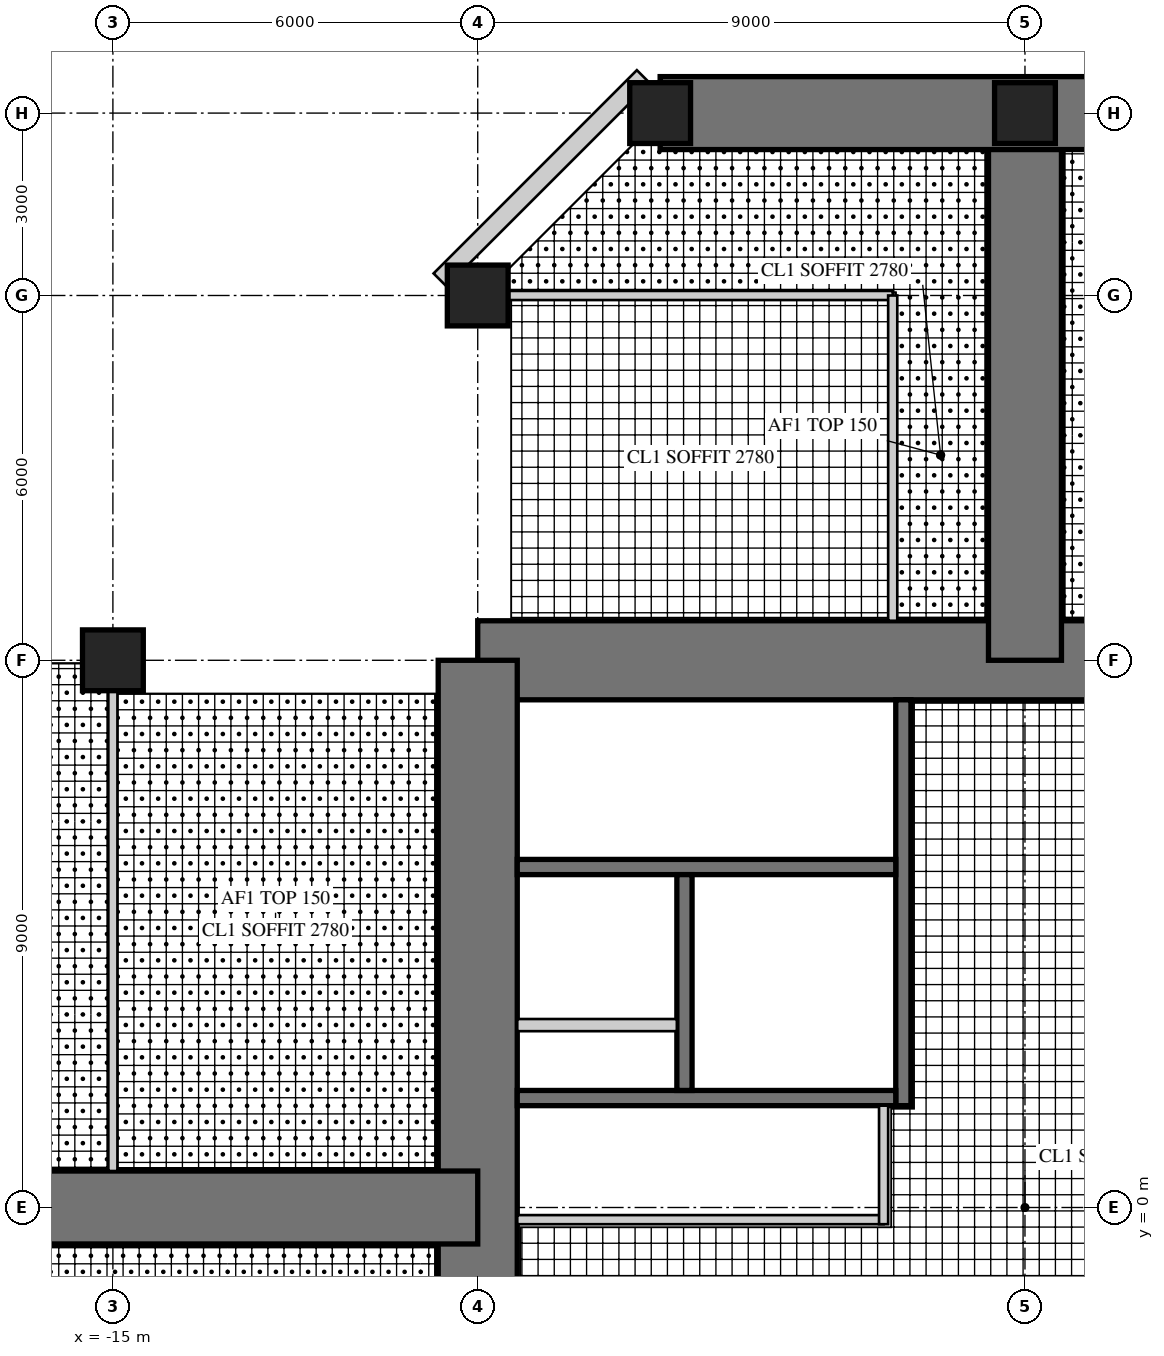
"""IFC4 building model, lengths in metres.
Left out: names, types, materials, properties, quantities, classifications, styles, units other than length and angle.
Written with IfcOpenShell. Run it as: python <this file> out.ifc"""

import sys

from ifc_helpers import new_model, si_unit, direction, frame, frame_2d, origin, origin_2d, place, context, subcontext, project, spatial, rectangle, hollow_rectangle, extrude, element, fill, save


model = new_model("IFC4")
c1 = context("Model", 3, precision=1e-05, world=origin(), true_north=direction((0.0, 1.0)))
c2 = subcontext(c1, "Body", "Model", "MODEL_VIEW")
j1 = project(units=[si_unit("LENGTHUNIT", "METRE"), si_unit("PLANEANGLEUNIT", "RADIAN")], contexts=[c1])
p1 = place(None, origin())
s1 = spatial("IfcSite", under=j1, at=p1, CompositionType="ELEMENT")
p2 = place(p1, origin())
s2 = spatial("IfcBuilding", under=s1, at=p2, CompositionType="ELEMENT")
p3 = place(p2, frame((0.0, 0.0, 152.5)))
s3 = spatial("IfcBuildingStorey", under=s2, at=p3, CompositionType="ELEMENT", Elevation=152.5)
p4 = place(p3, frame((9.0, 9.0, 0.0), z_axis=(0.0, 0.0, 1.0), x_axis=(-1.0, 0.0, 0.0)))
e1 = element("IfcWall", 1, at=p4, inside=s3, PredefinedType="SHEAR", context=c2, shape_type="SweptSolid", body=[
    extrude(rectangle(XDim=18.0, YDim=1.3, at=frame_2d((9.0, 0.0))), origin(), (0.0, 0.0, 1.0), 4.0),
])
p5 = place(p4, frame((9.8, 0.0, 0.0)))
e2 = element("IfcOpeningElement", 2, at=p5, cuts=e1, PredefinedType="OPENING", context=c2, shape_type="SweptSolid", body=[
    extrude(rectangle(XDim=1.0, YDim=2.4, at=frame_2d((0.5, 1.2))), frame((0.0, 0.66, 0.0), z_axis=(0.0, -1.0, 0.0), x_axis=(1.0, 0.0, 0.0)), (0.0, 0.0, 1.0), 1.32),
])
p6 = place(p3, frame((-9.0, 9.0, 0.0), z_axis=(0.0, 0.0, 1.0), x_axis=(0.0, -1.0, 0.0)))
e3 = element("IfcWall", 3, at=p6, inside=s3, PredefinedType="SHEAR", context=c2, shape_type="SweptSolid", body=[
    extrude(rectangle(XDim=18.0, YDim=1.3, at=frame_2d((9.0, 0.0))), origin(), (0.0, 0.0, 1.0), 4.0),
])
p7 = place(p6, frame((9.8, 0.0, 0.0)))
e4 = element("IfcOpeningElement", 4, at=p7, cuts=e3, PredefinedType="OPENING", context=c2, shape_type="SweptSolid", body=[
    extrude(rectangle(XDim=1.0, YDim=2.4, at=frame_2d((0.5, 1.2))), frame((0.0, 0.66, 0.0), z_axis=(0.0, -1.0, 0.0), x_axis=(1.0, 0.0, 0.0)), (0.0, 0.0, 1.0), 1.32),
])
p8 = place(p3, frame((-2.0, 1.675, 0.0), z_axis=(0.0, 0.0, 1.0), x_axis=(0.0, 1.0, 0.0)))
e5 = element("IfcWall", 5, at=p8, inside=s3, PredefinedType="SHEAR", context=c2, shape_type="SweptSolid", body=[
    extrude(rectangle(XDim=6.675, YDim=0.25, at=frame_2d((3.337, 0.0))), origin(), (0.0, 0.0, 1.0), 4.0),
])
p9 = place(p8, frame((0.725, 0.0, 0.0)))
e6 = element("IfcOpeningElement", 6, at=p9, cuts=e5, PredefinedType="OPENING", context=c2, shape_type="SweptSolid", body=[
    extrude(rectangle(XDim=1.0, YDim=2.1, at=frame_2d((0.5, 1.05))), frame((0.0, 0.135, 0.0), z_axis=(0.0, -1.0, 0.0), x_axis=(1.0, 0.0, 0.0)), (0.0, 0.0, 1.0), 0.27),
])
p10 = place(p3, frame((-2.125, 1.8, 0.0), z_axis=(0.0, 0.0, 1.0), x_axis=(-1.0, 0.0, 0.0)))
e7 = element("IfcWall", 7, at=p10, inside=s3, PredefinedType="SHEAR", context=c2, shape_type="SweptSolid", body=[
    extrude(rectangle(XDim=6.225, YDim=0.25, at=frame_2d((3.113, 0.0))), origin(), (0.0, 0.0, 1.0), 4.0),
])
p11 = place(p3, frame((-2.125, 5.6, 0.0), z_axis=(0.0, 0.0, 1.0), x_axis=(-1.0, 0.0, 0.0)))
e8 = element("IfcWall", 8, at=p11, inside=s3, PredefinedType="SHEAR", context=c2, shape_type="SweptSolid", body=[
    extrude(rectangle(XDim=6.225, YDim=0.25, at=frame_2d((3.113, 0.0))), origin(), (0.0, 0.0, 1.0), 4.0),
])
p12 = place(p11, frame((0.175, 0.0, 0.0)))
e9 = element("IfcOpeningElement", 9, at=p12, cuts=e8, PredefinedType="OPENING", context=c2, shape_type="SweptSolid", body=[
    extrude(rectangle(XDim=1.0, YDim=2.1, at=frame_2d((0.5, 1.05))), frame((0.0, 0.135, 0.0), z_axis=(0.0, -1.0, 0.0), x_axis=(1.0, 0.0, 0.0)), (0.0, 0.0, 1.0), 0.27),
])
p13 = place(p3, frame((-5.6, 1.925, 0.0), z_axis=(0.0, 0.0, 1.0), x_axis=(0.0, 1.0, 0.0)))
e10 = element("IfcWall", 10, at=p13, inside=s3, PredefinedType="SHEAR", context=c2, shape_type="SweptSolid", body=[
    extrude(rectangle(XDim=3.55, YDim=0.25, at=frame_2d((1.775, 0.0))), origin(), (0.0, 0.0, 1.0), 4.0),
])
p14 = place(p13, frame((1.525, 0.0, 0.0)))
e11 = element("IfcOpeningElement", 11, at=p14, cuts=e10, PredefinedType="OPENING", context=c2, shape_type="SweptSolid", body=[
    extrude(rectangle(XDim=1.1, YDim=2.2, at=frame_2d((0.55, 1.1))), frame((0.0, 0.135, 0.0), z_axis=(0.0, -1.0, 0.0), x_axis=(1.0, 0.0, 0.0)), (0.0, 0.0, 1.0), 0.27),
])
p15 = place(p13, frame((0.075, 0.0, 0.0)))
e12 = element("IfcOpeningElement", 12, at=p15, cuts=e10, PredefinedType="OPENING", context=c2, shape_type="SweptSolid", body=[
    extrude(rectangle(XDim=0.8, YDim=2.1, at=frame_2d((0.4, 1.05))), frame((0.0, 0.135, 0.0), z_axis=(0.0, -1.0, 0.0), x_axis=(1.0, 0.0, 0.0)), (0.0, 0.0, 1.0), 0.27),
])
p16 = place(p3, frame((-5.725, 3.0, 0.0), z_axis=(0.0, 0.0, 1.0), x_axis=(-1.0, 0.0, 0.0)))
e13 = element("IfcWall", 13, at=p16, inside=s3, PredefinedType="PARTITIONING", context=c2, shape_type="SweptSolid", body=[
    extrude(rectangle(XDim=2.625, YDim=0.2, at=frame_2d((1.312, 0.0))), origin(), (0.0, 0.0, 1.0), 4.0),
])
p17 = place(p3, frame((0.0, 9.0, 0.0), z_axis=(0.0, 0.0, 1.0), x_axis=(0.0, 1.0, 0.0)))
e14 = element("IfcWall", 14, at=p17, inside=s3, PredefinedType="SHEAR", context=c2, shape_type="SweptSolid", body=[
    extrude(rectangle(XDim=9.0, YDim=1.2, at=frame_2d((4.5, 0.0))), origin(), (0.0, 0.0, 1.0), 4.0),
])
p18 = place(p17, frame((4.3, 0.0, 0.0)))
e15 = element("IfcOpeningElement", 15, at=p18, cuts=e14, PredefinedType="OPENING", context=c2, shape_type="SweptSolid", body=[
    extrude(rectangle(XDim=1.0, YDim=2.2, at=frame_2d((0.5, 1.1))), frame((0.0, 0.61, 0.0), z_axis=(0.0, -1.0, 0.0), x_axis=(1.0, 0.0, 0.0)), (0.0, 0.0, 1.0), 1.22),
])
p19 = place(p3, frame((6.0, 18.0, 0.0), z_axis=(0.0, 0.0, 1.0), x_axis=(-1.0, 0.0, 0.0)))
e16 = element("IfcWall", 16, at=p19, inside=s3, PredefinedType="SHEAR", context=c2, shape_type="SweptSolid", body=[
    extrude(rectangle(XDim=12.0, YDim=1.2, at=frame_2d((6.0, 0.0))), origin(), (0.0, 0.0, 1.0), 4.0),
])
p20 = place(p19, frame((1.55, 0.0, 0.6)))
e17 = element("IfcOpeningElement", 17, at=p20, cuts=e16, PredefinedType="OPENING", context=c2, shape_type="SweptSolid", body=[
    extrude(rectangle(XDim=3.0, YDim=2.4, at=frame_2d((1.5, 1.2))), frame((0.0, 0.61, 0.0), z_axis=(0.0, -1.0, 0.0), x_axis=(1.0, 0.0, 0.0)), (0.0, 0.0, 1.0), 1.22),
])
p21 = place(p19, frame((7.45, 0.0, 0.6)))
e18 = element("IfcOpeningElement", 18, at=p21, cuts=e16, PredefinedType="OPENING", context=c2, shape_type="SweptSolid", body=[
    extrude(rectangle(XDim=3.0, YDim=2.4, at=frame_2d((1.5, 1.2))), frame((0.0, 0.61, 0.0), z_axis=(0.0, -1.0, 0.0), x_axis=(1.0, 0.0, 0.0)), (0.0, 0.0, 1.0), 1.22),
])
p22 = place(p3, frame((-9.0, 0.0, 0.0), z_axis=(0.0, 0.0, 1.0), x_axis=(-1.0, 0.0, 0.0)))
e19 = element("IfcWall", 19, at=p22, inside=s3, PredefinedType="SHEAR", context=c2, shape_type="SweptSolid", body=[
    extrude(rectangle(XDim=18.0, YDim=1.2, at=frame_2d((9.0, 0.0))), origin(), (0.0, 0.0, 1.0), 4.0),
])
p23 = place(p22, frame((9.8, 0.0, 0.0)))
e20 = element("IfcOpeningElement", 20, at=p23, cuts=e19, PredefinedType="OPENING", context=c2, shape_type="SweptSolid", body=[
    extrude(rectangle(XDim=1.0, YDim=2.2, at=frame_2d((0.5, 1.1))), frame((0.0, 0.61, 0.0), z_axis=(0.0, -1.0, 0.0), x_axis=(1.0, 0.0, 0.0)), (0.0, 0.0, 1.0), 1.22),
])
for number, where, z_axis, x_axis in (
    (21, (-9.0, 15.0, 0.0), (0.0, 0.0, 1.0), (1.0, 0.0, 0.0)),
    (22, (0.0, 18.0, 0.0), (0.0, 0.0, 1.0), (1.0, 0.0, 0.0)),
    (23, (-6.0, 18.0, 0.0), (0.0, 0.0, 1.0), (1.0, 0.0, 0.0)),
    (24, (-15.0, 9.0, 0.0), (0.0, 0.0, 1.0), (1.0, 0.0, 0.0)),
):
    element("IfcColumn", number, at=place(p3, frame(where, z_axis=z_axis, x_axis=x_axis)), inside=s3, PredefinedType="COLUMN", context=c2, shape_type="SweptSolid", body=[
        extrude(rectangle(XDim=1.0, YDim=1.0, at=origin_2d()), origin(), (0.0, 0.0, 1.0), 4.0),
    ])
p24 = place(p3, frame((-6.277, 18.6, 0.0), z_axis=(0.0, 0.0, 1.0), x_axis=(-0.707106781187, -0.707106781187, 0.0)))
e25 = element("IfcWall", 25, at=p24, inside=s3, PredefinedType="SOLIDWALL", context=c2, shape_type="SweptSolid", body=[
    extrude(rectangle(XDim=4.728, YDim=0.3, at=frame_2d((2.364, 0.0))), origin(), (0.0, 0.0, 1.0), 3.8),
])
p25 = place(p24, frame((1.914, 0.0, 0.3)))
e26 = element("IfcOpeningElement", 26, at=p25, cuts=e25, PredefinedType="OPENING", context=c2, shape_type="SweptSolid", body=[
    extrude(rectangle(XDim=0.9, YDim=2.4, at=frame_2d((0.45, 1.2))), frame((0.0, 0.16, 0.0), z_axis=(0.0, -1.0, 0.0), x_axis=(1.0, 0.0, 0.0)), (0.0, 0.0, 1.0), 0.32),
])
p26 = place(p3, frame((-2.325, -0.2, 0.0), z_axis=(0.0, 0.0, 1.0), x_axis=(-1.0, 0.0, 0.0)))
e27 = element("IfcWall", 27, at=p26, inside=s3, PredefinedType="PARTITIONING", context=c2, shape_type="SweptSolid", body=[
    extrude(rectangle(XDim=6.025, YDim=0.15, at=frame_2d((3.013, 0.0))), origin(), (0.0, 0.0, 1.0), 3.8),
])
p27 = place(p26, frame((0.4, 0.0, 0.0)))
e28 = element("IfcOpeningElement", 28, at=p27, cuts=e27, PredefinedType="OPENING", context=c2, shape_type="SweptSolid", body=[
    extrude(rectangle(XDim=1.0, YDim=2.1, at=frame_2d((0.5, 1.05))), frame((0.0, 0.085, 0.0), z_axis=(0.0, -1.0, 0.0), x_axis=(1.0, 0.0, 0.0)), (0.0, 0.0, 1.0), 0.17),
])
p28 = place(p3, frame((-2.325, 1.675, 0.0), z_axis=(0.0, 0.0, 1.0), x_axis=(0.0, -1.0, 0.0)))
e29 = element("IfcWall", 29, at=p28, inside=s3, PredefinedType="PARTITIONING", context=c2, shape_type="SweptSolid", body=[
    extrude(rectangle(XDim=1.95, YDim=0.15, at=frame_2d((0.975, 0.0))), origin(), (0.0, 0.0, 1.0), 3.8),
])
p29 = place(p3, frame((-2.175, 15.0, 0.0), z_axis=(0.0, 0.0, 1.0), x_axis=(-1.0, 0.0, 0.0)))
e30 = element("IfcWall", 30, at=p29, inside=s3, PredefinedType="PARTITIONING", context=c2, shape_type="SweptSolid", body=[
    extrude(rectangle(XDim=6.325, YDim=0.15, at=frame_2d((3.163, 0.0))), origin(), (0.0, 0.0, 1.0), 3.0),
])
p30 = place(p29, frame((2.663, 0.0, 0.0)))
e31 = element("IfcOpeningElement", 31, at=p30, cuts=e30, PredefinedType="OPENING", context=c2, shape_type="SweptSolid", body=[
    extrude(rectangle(XDim=1.0, YDim=2.1, at=frame_2d((0.5, 1.05))), frame((0.0, 0.085, 0.0), z_axis=(0.0, -1.0, 0.0), x_axis=(1.0, 0.0, 0.0)), (0.0, 0.0, 1.0), 0.17),
])
p31 = place(p3, frame((-2.175, 9.65, 0.0), z_axis=(0.0, 0.0, 1.0), x_axis=(0.0, 1.0, 0.0)))
e32 = element("IfcWall", 32, at=p31, inside=s3, PredefinedType="PARTITIONING", context=c2, shape_type="SweptSolid", body=[
    extrude(rectangle(XDim=5.35, YDim=0.15, at=frame_2d((2.675, 0.0))), origin(), (0.0, 0.0, 1.0), 3.8),
])
p32 = place(p3, frame((-15.0, 8.5, 0.0), z_axis=(0.0, 0.0, 1.0), x_axis=(0.0, -1.0, 0.0)))
e33 = element("IfcWall", 33, at=p32, inside=s3, PredefinedType="PARTITIONING", context=c2, shape_type="SweptSolid", body=[
    extrude(rectangle(XDim=7.9, YDim=0.15, at=frame_2d((3.95, 0.0))), origin(), (0.0, 0.0, 1.0), 3.0),
])
p33 = place(p32, frame((3.45, 0.0, 0.0)))
e34 = element("IfcOpeningElement", 34, at=p33, cuts=e33, PredefinedType="OPENING", context=c2, shape_type="SweptSolid", body=[
    extrude(rectangle(XDim=1.0, YDim=2.1, at=frame_2d((0.5, 1.05))), frame((0.0, 0.085, 0.0), z_axis=(0.0, -1.0, 0.0), x_axis=(1.0, 0.0, 0.0)), (0.0, 0.0, 1.0), 0.17),
])
p34 = place(p21, origin())
e35 = element("IfcWindow", 35, at=p34, inside=s3, PartitioningType="SINGLE_PANEL", PredefinedType="WINDOW", context=c2, shape_type="SweptSolid", body=[
    extrude(hollow_rectangle(XDim=3.0, YDim=2.4, WallThickness=0.06, at=frame_2d((1.5, 1.2))), frame((0.0, 0.03, 0.0), z_axis=(0.0, -1.0, 0.0), x_axis=(1.0, 0.0, 0.0)), (0.0, 0.0, 1.0), 0.06),
    extrude(rectangle(XDim=2.879, YDim=2.279, at=frame_2d((1.5, 1.2))), frame((0.0, 0.03, 0.0), z_axis=(0.0, -1.0, 0.0), x_axis=(1.0, 0.0, 0.0)), (0.0, 0.0, 1.0), 0.06),
])
fill(e18, e35)
p35 = place(p25, origin())
e36 = element("IfcWindow", 36, at=p35, inside=s3, PartitioningType="SINGLE_PANEL", PredefinedType="WINDOW", context=c2, shape_type="SweptSolid", body=[
    extrude(hollow_rectangle(XDim=0.9, YDim=2.4, WallThickness=0.06, at=frame_2d((0.45, 1.2))), frame((0.0, 0.03, 0.0), z_axis=(0.0, -1.0, 0.0), x_axis=(1.0, 0.0, 0.0)), (0.0, 0.0, 1.0), 0.06),
    extrude(rectangle(XDim=0.779, YDim=2.279, at=frame_2d((0.45, 1.2))), frame((0.0, 0.03, 0.0), z_axis=(0.0, -1.0, 0.0), x_axis=(1.0, 0.0, 0.0)), (0.0, 0.0, 1.0), 0.06),
])
fill(e26, e36)
p36 = place(p27, frame((1.0, 0.0, 0.0), z_axis=(0.0, 0.0, 1.0), x_axis=(-1.0, 0.0, 0.0)))
e37 = element("IfcDoor", 37, at=p36, inside=s3, OperationType="SINGLE_SWING_RIGHT", PredefinedType="DOOR", context=c2, shape_type="SweptSolid", body=[
    extrude(rectangle(XDim=1.0, YDim=2.1, at=frame_2d((0.5, 1.05))), frame((0.0, 0.025, 0.0), z_axis=(0.0, -1.0, 0.0), x_axis=(1.0, 0.0, 0.0)), (0.0, 0.0, 1.0), 0.05),
])
fill(e28, e37)
p37 = place(p30, frame((1.0, 0.0, 0.0), z_axis=(0.0, 0.0, 1.0), x_axis=(-1.0, 0.0, 0.0)))
e38 = element("IfcDoor", 38, at=p37, inside=s3, OperationType="SINGLE_SWING_LEFT", PredefinedType="DOOR", context=c2, shape_type="SweptSolid", body=[
    extrude(rectangle(XDim=1.0, YDim=2.1, at=frame_2d((0.5, 1.05))), frame((0.0, 0.025, 0.0), z_axis=(0.0, -1.0, 0.0), x_axis=(1.0, 0.0, 0.0)), (0.0, 0.0, 1.0), 0.05),
])
fill(e31, e38)
p38 = place(p33, origin())
e39 = element("IfcDoor", 39, at=p38, inside=s3, OperationType="SINGLE_SWING_RIGHT", PredefinedType="DOOR", context=c2, shape_type="SweptSolid", body=[
    extrude(rectangle(XDim=1.0, YDim=2.1, at=frame_2d((0.5, 1.05))), frame((0.0, 0.025, 0.0), z_axis=(0.0, -1.0, 0.0), x_axis=(1.0, 0.0, 0.0)), (0.0, 0.0, 1.0), 0.05),
])
fill(e34, e39)
p39 = place(p18, origin())
e40 = element("IfcDoor", 40, at=p39, inside=s3, OperationType="SINGLE_SWING_RIGHT", PredefinedType="DOOR", context=c2, shape_type="SweptSolid", body=[
    extrude(rectangle(XDim=1.0, YDim=2.2, at=frame_2d((0.5, 1.1))), frame((0.0, 0.025, 0.0), z_axis=(0.0, -1.0, 0.0), x_axis=(1.0, 0.0, 0.0)), (0.0, 0.0, 1.0), 0.05),
])
fill(e15, e40)
p40 = place(p5, frame((1.0, 0.0, 0.0), z_axis=(0.0, 0.0, 1.0), x_axis=(-1.0, 0.0, 0.0)))
e41 = element("IfcDoor", 41, at=p40, inside=s3, OperationType="SINGLE_SWING_RIGHT", PredefinedType="DOOR", context=c2, shape_type="SweptSolid", body=[
    extrude(rectangle(XDim=1.0, YDim=2.4, at=frame_2d((0.5, 1.2))), frame((0.0, -0.005, 0.0), z_axis=(0.0, -1.0, 0.0), x_axis=(1.0, 0.0, 0.0)), (0.0, 0.0, 1.0), 0.05),
])
fill(e2, e41)
p41 = place(p7, frame((1.0, 0.0, 0.0), z_axis=(0.0, 0.0, 1.0), x_axis=(-1.0, 0.0, 0.0)))
e42 = element("IfcDoor", 42, at=p41, inside=s3, OperationType="SINGLE_SWING_RIGHT", PredefinedType="DOOR", context=c2, shape_type="SweptSolid", body=[
    extrude(rectangle(XDim=1.0, YDim=2.4, at=frame_2d((0.5, 1.2))), frame((0.0, -0.005, 0.0), z_axis=(0.0, -1.0, 0.0), x_axis=(1.0, 0.0, 0.0)), (0.0, 0.0, 1.0), 0.05),
])
fill(e4, e42)
p42 = place(p9, origin())
e43 = element("IfcDoor", 43, at=p42, inside=s3, OperationType="SINGLE_SWING_LEFT", PredefinedType="DOOR", context=c2, shape_type="SweptSolid", body=[
    extrude(rectangle(XDim=1.0, YDim=2.1, at=frame_2d((0.5, 1.05))), frame((0.0, 0.025, 0.0), z_axis=(0.0, -1.0, 0.0), x_axis=(1.0, 0.0, 0.0)), (0.0, 0.0, 1.0), 0.05),
])
fill(e6, e43)
p43 = place(p12, frame((1.0, 0.0, 0.0), z_axis=(0.0, 0.0, 1.0), x_axis=(-1.0, 0.0, 0.0)))
e44 = element("IfcDoor", 44, at=p43, inside=s3, OperationType="SINGLE_SWING_RIGHT", PredefinedType="DOOR", context=c2, shape_type="SweptSolid", body=[
    extrude(rectangle(XDim=1.0, YDim=2.1, at=frame_2d((0.5, 1.05))), frame((0.0, 0.025, 0.0), z_axis=(0.0, -1.0, 0.0), x_axis=(1.0, 0.0, 0.0)), (0.0, 0.0, 1.0), 0.05),
])
fill(e9, e44)
p44 = place(p14, origin())
e45 = element("IfcDoor", 45, at=p44, inside=s3, OperationType="DOUBLE_DOOR_SLIDING", PredefinedType="DOOR", context=c2, shape_type="SweptSolid", body=[
    extrude(rectangle(XDim=1.1, YDim=2.2, at=frame_2d((0.55, 1.1))), frame((0.0, 0.025, 0.0), z_axis=(0.0, -1.0, 0.0), x_axis=(1.0, 0.0, 0.0)), (0.0, 0.0, 1.0), 0.05),
])
fill(e11, e45)
p45 = place(p15, origin())
e46 = element("IfcDoor", 46, at=p45, inside=s3, OperationType="SINGLE_SWING_LEFT", PredefinedType="DOOR", context=c2, shape_type="SweptSolid", body=[
    extrude(rectangle(XDim=0.8, YDim=2.1, at=frame_2d((0.4, 1.05))), frame((0.0, 0.025, 0.0), z_axis=(0.0, -1.0, 0.0), x_axis=(1.0, 0.0, 0.0)), (0.0, 0.0, 1.0), 0.05),
])
fill(e12, e46)
save(model, sys.argv[1])
